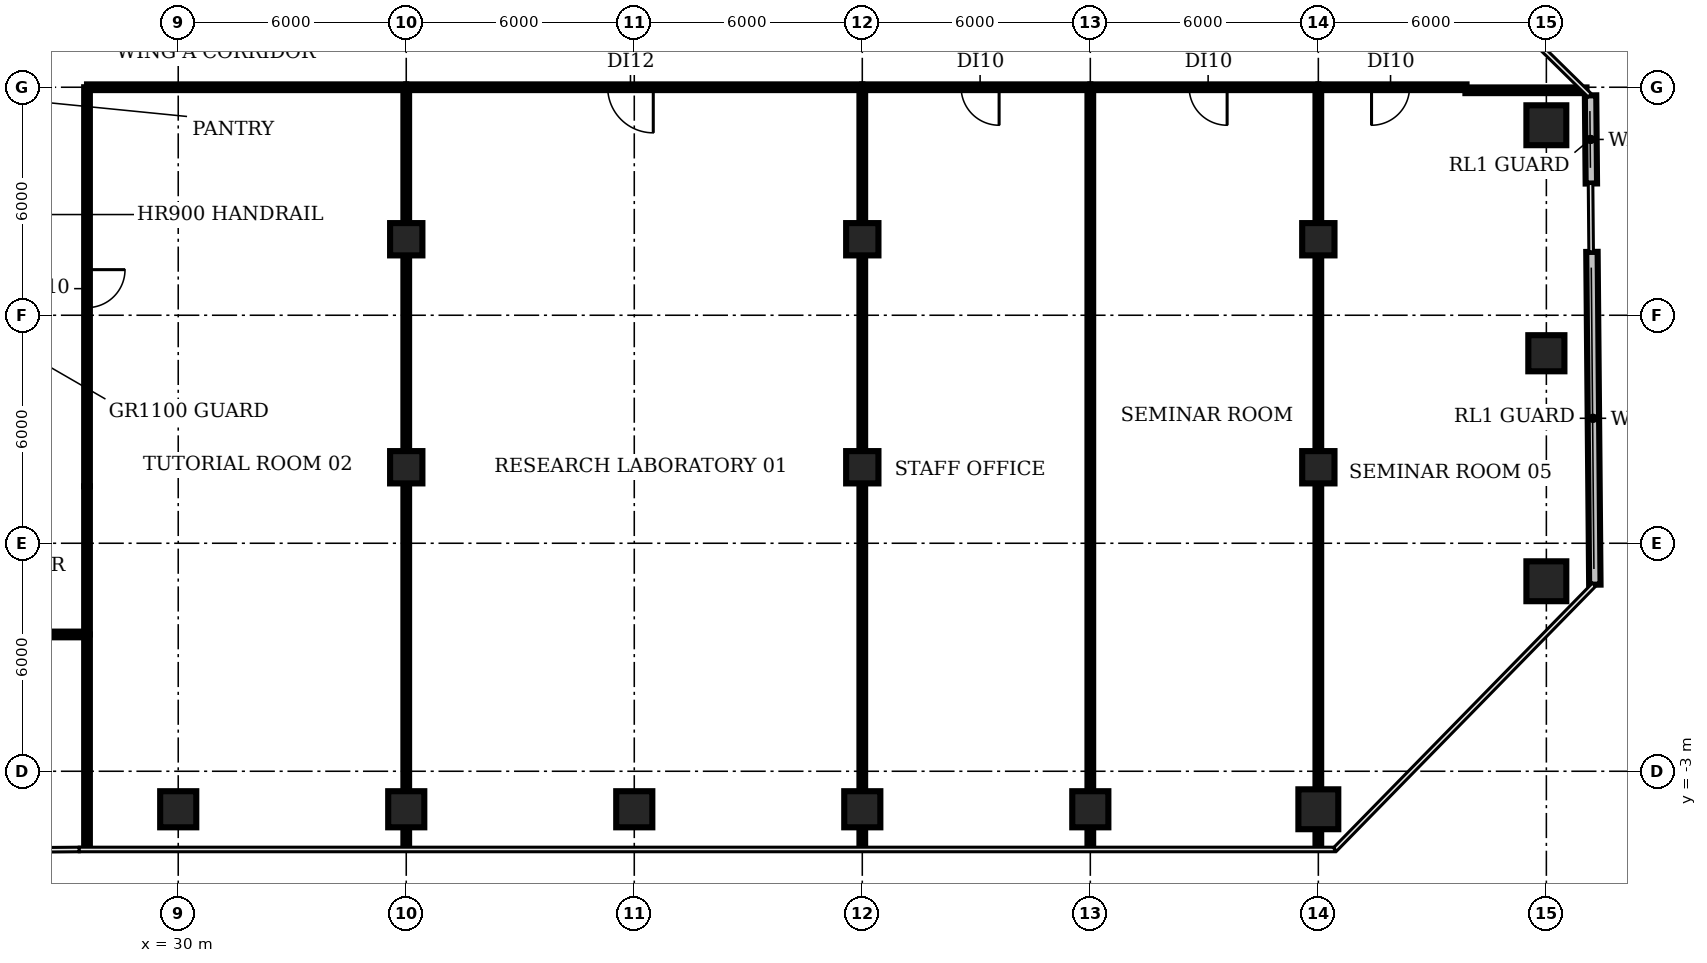
"""IFC4 building model, lengths in metres.
Left out: names, types, materials, properties, quantities, classifications, styles, units other than length and angle.
Written with IfcOpenShell. Run it as: python <this file> out.ifc"""

import sys

from ifc_helpers import new_model, si_unit, direction, frame, frame_2d, origin, origin_2d, place, context, subcontext, project, spatial, rectangle, circle, extrude, element, fill, save


model = new_model("IFC4")
c1 = context("Model", 3, precision=1e-05, world=origin(), true_north=direction((0.0, 1.0)))
c2 = subcontext(c1, "Body", "Model", "MODEL_VIEW")
j1 = project(units=[si_unit("LENGTHUNIT", "METRE"), si_unit("PLANEANGLEUNIT", "RADIAN")], contexts=[c1])
p1 = place(None, origin())
s1 = spatial("IfcSite", under=j1, at=p1, CompositionType="ELEMENT")
p2 = place(p1, origin())
s2 = spatial("IfcBuilding", under=s1, at=p2, CompositionType="ELEMENT")
p3 = place(p2, frame((0.0, 0.0, 54.2)))
s3 = spatial("IfcBuildingStorey", under=s2, at=p3, CompositionType="ELEMENT", Elevation=54.2)
for number, where, z_axis, x_axis in (
    (1, (30.0, -4.0, 0.0), (0.0, 0.0, 1.0), (1.0, 0.0, 0.0)),
    (2, (36.0, -4.0, 0.0), (0.0, 0.0, 1.0), (1.0, 0.0, 0.0)),
):
    element("IfcColumn", number, at=place(p3, frame(where, z_axis=z_axis, x_axis=x_axis)), inside=s3, PredefinedType="COLUMN", context=c2, shape_type="SweptSolid", body=[
        extrude(rectangle(XDim=0.95, YDim=0.95, at=origin_2d()), origin(), (0.0, 0.0, 1.0), 3.85),
    ])
for number, where, z_axis, x_axis in (
    (3, (36.0, 5.0, 0.0), (0.0, 0.0, 1.0), (1.0, 0.0, 0.0)),
    (4, (36.0, 11.0, 0.0), (0.0, 0.0, 1.0), (1.0, 0.0, 0.0)),
):
    element("IfcColumn", number, at=place(p3, frame(where, z_axis=z_axis, x_axis=x_axis)), inside=s3, PredefinedType="COLUMN", context=c2, shape_type="SweptSolid", body=[
        extrude(rectangle(XDim=0.85, YDim=0.85, at=origin_2d()), origin(), (0.0, 0.0, 1.0), 3.85),
    ])
for number, where, z_axis, x_axis in (
    (5, (42.0, -4.0, 0.0), (0.0, 0.0, 1.0), (1.0, 0.0, 0.0)),
    (6, (48.0, -4.0, 0.0), (0.0, 0.0, 1.0), (1.0, 0.0, 0.0)),
):
    element("IfcColumn", number, at=place(p3, frame(where, z_axis=z_axis, x_axis=x_axis)), inside=s3, PredefinedType="COLUMN", context=c2, shape_type="SweptSolid", body=[
        extrude(rectangle(XDim=0.95, YDim=0.95, at=origin_2d()), origin(), (0.0, 0.0, 1.0), 3.85),
    ])
for number, where, z_axis, x_axis in (
    (7, (48.0, 5.0, 0.0), (0.0, 0.0, 1.0), (1.0, 0.0, 0.0)),
    (8, (48.0, 11.0, 0.0), (0.0, 0.0, 1.0), (1.0, 0.0, 0.0)),
):
    element("IfcColumn", number, at=place(p3, frame(where, z_axis=z_axis, x_axis=x_axis)), inside=s3, PredefinedType="COLUMN", context=c2, shape_type="SweptSolid", body=[
        extrude(rectangle(XDim=0.85, YDim=0.85, at=origin_2d()), origin(), (0.0, 0.0, 1.0), 3.85),
    ])
p4 = place(p3, frame((54.0, -4.0, 0.0), z_axis=(0.0, 0.0, 1.0), x_axis=(1.0, 0.0, 0.0)))
e9 = element("IfcColumn", 9, at=p4, inside=s3, PredefinedType="COLUMN", context=c2, shape_type="SweptSolid", body=[
    extrude(rectangle(XDim=0.95, YDim=0.95, at=origin_2d()), origin(), (0.0, 0.0, 1.0), 3.85),
])
p5 = place(p3, frame((60.0, -4.0, 0.0), z_axis=(0.0, 0.0, 1.0), x_axis=(1.0, 0.0, 0.0)))
e10 = element("IfcColumn", 10, at=p5, inside=s3, PredefinedType="COLUMN", context=c2, shape_type="SweptSolid", body=[
    extrude(circle(Radius=0.525, at=origin_2d()), origin(), (0.0, 0.0, 1.0), 3.85),
])
for number, where, z_axis, x_axis in (
    (11, (60.0, 5.0, 0.0), (0.0, 0.0, 1.0), (1.0, 0.0, 0.0)),
    (12, (60.0, 11.0, 0.0), (0.0, 0.0, 1.0), (1.0, 0.0, 0.0)),
):
    element("IfcColumn", number, at=place(p3, frame(where, z_axis=z_axis, x_axis=x_axis)), inside=s3, PredefinedType="COLUMN", context=c2, shape_type="SweptSolid", body=[
        extrude(rectangle(XDim=0.85, YDim=0.85, at=origin_2d()), origin(), (0.0, 0.0, 1.0), 3.85),
    ])
p6 = place(p3, frame((66.0, 2.0, 0.0), z_axis=(0.0, 0.0, 1.0), x_axis=(1.0, 0.0, 0.0)))
e13 = element("IfcColumn", 13, at=p6, inside=s3, PredefinedType="COLUMN", context=c2, shape_type="SweptSolid", body=[
    extrude(circle(Radius=0.525, at=origin_2d()), origin(), (0.0, 0.0, 1.0), 3.85),
])
p7 = place(p3, frame((66.0, 8.0, 0.0), z_axis=(0.0, 0.0, 1.0), x_axis=(1.0, 0.0, 0.0)))
e14 = element("IfcColumn", 14, at=p7, inside=s3, PredefinedType="COLUMN", context=c2, shape_type="SweptSolid", body=[
    extrude(rectangle(XDim=0.95, YDim=0.95, at=origin_2d()), origin(), (0.0, 0.0, 1.0), 3.85),
])
p8 = place(p3, frame((66.0, 14.0, 0.0), z_axis=(0.0, 0.0, 1.0), x_axis=(1.0, 0.0, 0.0)))
e15 = element("IfcColumn", 15, at=p8, inside=s3, PredefinedType="COLUMN", context=c2, shape_type="SweptSolid", body=[
    extrude(circle(Radius=0.525, at=origin_2d()), origin(), (0.0, 0.0, 1.0), 3.85),
])
p9 = place(p3, frame((67.276, 1.91, 0.0), z_axis=(0.0, 0.0, 1.0), x_axis=(-0.008726109153, 0.999961926785, 0.0)))
e16 = element("IfcWall", 16, at=p9, inside=s3, PredefinedType="SOLIDWALL", context=c2, shape_type="SweptSolid", body=[
    extrude(rectangle(XDim=8.757, YDim=0.3, at=frame_2d((4.378, 0.0))), origin(), (0.0, 0.0, 1.0), 3.85),
])
p10 = place(p3, frame((67.184, 12.467, 0.0), z_axis=(0.0, 0.0, 1.0), x_axis=(-0.008738348184, 0.999961819907, 0.0)))
e17 = element("IfcWall", 17, at=p10, inside=s3, PredefinedType="SOLIDWALL", context=c2, shape_type="SweptSolid", body=[
    extrude(rectangle(XDim=2.319, YDim=0.3, at=frame_2d((1.159, 0.0))), origin(), (0.0, 0.0, 1.0), 3.85),
])
p11 = place(p3, frame((27.6, -5.01, 0.0), z_axis=(0.0, 0.0, 1.0), x_axis=(0.0, 1.0, 0.0)))
e18 = element("IfcWall", 18, at=p11, inside=s3, PredefinedType="PARTITIONING", context=c2, shape_type="SweptSolid", body=[
    extrude(rectangle(XDim=5.61, YDim=0.15, at=frame_2d((2.805, 0.0))), origin(), (0.0, 0.0, 1.0), 2.83),
])
p12 = place(p3, frame((27.6, 0.6, 0.0), z_axis=(0.0, 0.0, 1.0), x_axis=(-1.0, 0.0, 0.0)))
e19 = element("IfcWall", 19, at=p12, inside=s3, PredefinedType="PARTITIONING", context=c2, shape_type="SweptSolid", body=[
    extrude(rectangle(XDim=25.2, YDim=0.15, at=frame_2d((12.6, 0.0))), origin(), (0.0, 0.0, 1.0), 2.83),
])
p13 = place(p12, frame((12.1, 0.0, 0.0)))
e20 = element("IfcOpeningElement", 20, at=p13, cuts=e19, PredefinedType="OPENING", context=c2, shape_type="SweptSolid", body=[
    extrude(rectangle(XDim=1.2, YDim=2.1, at=frame_2d((0.6, 1.05))), frame((0.0, 0.085, 0.0), z_axis=(0.0, -1.0, 0.0), x_axis=(1.0, 0.0, 0.0)), (0.0, 0.0, 1.0), 0.17),
])
p14 = place(p3, frame((27.6, 0.6, 0.0), z_axis=(0.0, 0.0, 1.0), x_axis=(0.0, 1.0, 0.0)))
e21 = element("IfcWall", 21, at=p14, inside=s3, PredefinedType="PARTITIONING", context=c2, shape_type="SweptSolid", body=[
    extrude(rectangle(XDim=3.9, YDim=0.15, at=frame_2d((1.95, 0.0))), origin(), (0.0, 0.0, 1.0), 2.83),
])
p15 = place(p3, frame((27.6, 15.0, 0.0), z_axis=(0.0, 0.0, 1.0), x_axis=(0.0, -1.0, 0.0)))
e22 = element("IfcWall", 22, at=p15, inside=s3, PredefinedType="PARTITIONING", context=c2, shape_type="SweptSolid", body=[
    extrude(rectangle(XDim=10.5, YDim=0.15, at=frame_2d((5.25, 0.0))), origin(), (0.0, 0.0, 1.0), 2.83),
])
p16 = place(p15, frame((4.8, 0.0, 0.0)))
e23 = element("IfcOpeningElement", 23, at=p16, cuts=e22, PredefinedType="OPENING", context=c2, shape_type="SweptSolid", body=[
    extrude(rectangle(XDim=1.0, YDim=2.1, at=frame_2d((0.5, 1.05))), frame((0.0, 0.085, 0.0), z_axis=(0.0, -1.0, 0.0), x_axis=(1.0, 0.0, 0.0)), (0.0, 0.0, 1.0), 0.17),
])
p17 = place(p3, frame((27.6, 15.0, 0.0), z_axis=(0.0, 0.0, 1.0), x_axis=(1.0, 0.0, 0.0)))
e24 = element("IfcWall", 24, at=p17, inside=s3, PredefinedType="PARTITIONING", context=c2, shape_type="SweptSolid", body=[
    extrude(rectangle(XDim=8.4, YDim=0.15, at=frame_2d((4.2, 0.0))), origin(), (0.0, 0.0, 1.0), 2.83),
])
for number, where, z_axis, x_axis in (
    (25, (36.0, -5.01, 0.0), (0.0, 0.0, 1.0), (0.0, 1.0, 0.0)),
    (26, (48.0, -5.01, 0.0), (0.0, 0.0, 1.0), (0.0, 1.0, 0.0)),
):
    element("IfcWall", number, at=place(p3, frame(where, z_axis=z_axis, x_axis=x_axis)), inside=s3, PredefinedType="PARTITIONING", context=c2, shape_type="SweptSolid", body=[
        extrude(rectangle(XDim=20.01, YDim=0.15, at=frame_2d((10.005, 0.0))), origin(), (0.0, 0.0, 1.0), 2.83),
    ])
p18 = place(p3, frame((48.0, 15.0, 0.0), z_axis=(0.0, 0.0, 1.0), x_axis=(-1.0, 0.0, 0.0)))
e27 = element("IfcWall", 27, at=p18, inside=s3, PredefinedType="PARTITIONING", context=c2, shape_type="SweptSolid", body=[
    extrude(rectangle(XDim=12.0, YDim=0.15, at=frame_2d((6.0, 0.0))), origin(), (0.0, 0.0, 1.0), 2.83),
])
p19 = place(p18, frame((5.5, 0.0, 0.0)))
e28 = element("IfcOpeningElement", 28, at=p19, cuts=e27, PredefinedType="OPENING", context=c2, shape_type="SweptSolid", body=[
    extrude(rectangle(XDim=1.2, YDim=2.1, at=frame_2d((0.6, 1.05))), frame((0.0, 0.085, 0.0), z_axis=(0.0, -1.0, 0.0), x_axis=(1.0, 0.0, 0.0)), (0.0, 0.0, 1.0), 0.17),
])
p20 = place(p3, frame((54.0, -5.01, 0.0), z_axis=(0.0, 0.0, 1.0), x_axis=(0.0, 1.0, 0.0)))
e29 = element("IfcWall", 29, at=p20, inside=s3, PredefinedType="PARTITIONING", context=c2, shape_type="SweptSolid", body=[
    extrude(rectangle(XDim=20.01, YDim=0.15, at=frame_2d((10.005, 0.0))), origin(), (0.0, 0.0, 1.0), 2.83),
])
p21 = place(p3, frame((54.0, 15.0, 0.0), z_axis=(0.0, 0.0, 1.0), x_axis=(-1.0, 0.0, 0.0)))
e30 = element("IfcWall", 30, at=p21, inside=s3, PredefinedType="PARTITIONING", context=c2, shape_type="SweptSolid", body=[
    extrude(rectangle(XDim=6.0, YDim=0.15, at=frame_2d((3.0, 0.0))), origin(), (0.0, 0.0, 1.0), 2.83),
])
p22 = place(p21, frame((2.4, 0.0, 0.0)))
e31 = element("IfcOpeningElement", 31, at=p22, cuts=e30, PredefinedType="OPENING", context=c2, shape_type="SweptSolid", body=[
    extrude(rectangle(XDim=1.0, YDim=2.1, at=frame_2d((0.5, 1.05))), frame((0.0, 0.085, 0.0), z_axis=(0.0, -1.0, 0.0), x_axis=(1.0, 0.0, 0.0)), (0.0, 0.0, 1.0), 0.17),
])
p23 = place(p3, frame((60.0, -5.01, 0.0), z_axis=(0.0, 0.0, 1.0), x_axis=(0.0, 1.0, 0.0)))
e32 = element("IfcWall", 32, at=p23, inside=s3, PredefinedType="PARTITIONING", context=c2, shape_type="SweptSolid", body=[
    extrude(rectangle(XDim=20.01, YDim=0.15, at=frame_2d((10.005, 0.0))), origin(), (0.0, 0.0, 1.0), 2.83),
])
p24 = place(p3, frame((60.0, 15.0, 0.0), z_axis=(0.0, 0.0, 1.0), x_axis=(-1.0, 0.0, 0.0)))
e33 = element("IfcWall", 33, at=p24, inside=s3, PredefinedType="PARTITIONING", context=c2, shape_type="SweptSolid", body=[
    extrude(rectangle(XDim=6.0, YDim=0.15, at=frame_2d((3.0, 0.0))), origin(), (0.0, 0.0, 1.0), 2.83),
])
p25 = place(p24, frame((2.4, 0.0, 0.0)))
e34 = element("IfcOpeningElement", 34, at=p25, cuts=e33, PredefinedType="OPENING", context=c2, shape_type="SweptSolid", body=[
    extrude(rectangle(XDim=1.0, YDim=2.1, at=frame_2d((0.5, 1.05))), frame((0.0, 0.085, 0.0), z_axis=(0.0, -1.0, 0.0), x_axis=(1.0, 0.0, 0.0)), (0.0, 0.0, 1.0), 0.17),
])
p26 = place(p3, frame((63.87, 14.92, 0.0), z_axis=(0.0, 0.0, 1.0), x_axis=(1.0, 0.0, 0.0)))
e35 = element("IfcWall", 35, at=p26, inside=s3, PredefinedType="PARTITIONING", context=c2, shape_type="SweptSolid", body=[
    extrude(rectangle(XDim=3.186, YDim=0.15, at=frame_2d((1.593, 0.0))), origin(), (0.0, 0.0, 1.0), 2.83),
])
p27 = place(p3, frame((63.9, 15.0, 0.0), z_axis=(0.0, 0.0, 1.0), x_axis=(-1.0, 0.0, 0.0)))
e36 = element("IfcWall", 36, at=p27, inside=s3, PredefinedType="PARTITIONING", context=c2, shape_type="SweptSolid", body=[
    extrude(rectangle(XDim=3.9, YDim=0.15, at=frame_2d((1.95, 0.0))), origin(), (0.0, 0.0, 1.0), 2.83),
])
p28 = place(p27, frame((1.5, 0.0, 0.0)))
e37 = element("IfcOpeningElement", 37, at=p28, cuts=e36, PredefinedType="OPENING", context=c2, shape_type="SweptSolid", body=[
    extrude(rectangle(XDim=1.0, YDim=2.1, at=frame_2d((0.5, 1.05))), frame((0.0, 0.085, 0.0), z_axis=(0.0, -1.0, 0.0), x_axis=(1.0, 0.0, 0.0)), (0.0, 0.0, 1.0), 0.17),
])
p29 = place(p16, origin())
e38 = element("IfcDoor", 38, at=p29, inside=s3, OperationType="SINGLE_SWING_LEFT", PredefinedType="DOOR", context=c2, shape_type="SweptSolid", body=[
    extrude(rectangle(XDim=1.0, YDim=2.1, at=frame_2d((0.5, 1.05))), frame((0.0, 0.025, 0.0), z_axis=(0.0, -1.0, 0.0), x_axis=(1.0, 0.0, 0.0)), (0.0, 0.0, 1.0), 0.05),
])
fill(e23, e38)
p30 = place(p19, origin())
e39 = element("IfcDoor", 39, at=p30, inside=s3, OperationType="SINGLE_SWING_LEFT", PredefinedType="DOOR", context=c2, shape_type="SweptSolid", body=[
    extrude(rectangle(XDim=1.2, YDim=2.1, at=frame_2d((0.6, 1.05))), frame((0.0, 0.025, 0.0), z_axis=(0.0, -1.0, 0.0), x_axis=(1.0, 0.0, 0.0)), (0.0, 0.0, 1.0), 0.05),
])
fill(e28, e39)
p31 = place(p22, origin())
e40 = element("IfcDoor", 40, at=p31, inside=s3, OperationType="SINGLE_SWING_LEFT", PredefinedType="DOOR", context=c2, shape_type="SweptSolid", body=[
    extrude(rectangle(XDim=1.0, YDim=2.1, at=frame_2d((0.5, 1.05))), frame((0.0, 0.025, 0.0), z_axis=(0.0, -1.0, 0.0), x_axis=(1.0, 0.0, 0.0)), (0.0, 0.0, 1.0), 0.05),
])
fill(e31, e40)
p32 = place(p25, origin())
e41 = element("IfcDoor", 41, at=p32, inside=s3, OperationType="SINGLE_SWING_LEFT", PredefinedType="DOOR", context=c2, shape_type="SweptSolid", body=[
    extrude(rectangle(XDim=1.0, YDim=2.1, at=frame_2d((0.5, 1.05))), frame((0.0, 0.025, 0.0), z_axis=(0.0, -1.0, 0.0), x_axis=(1.0, 0.0, 0.0)), (0.0, 0.0, 1.0), 0.05),
])
fill(e34, e41)
p33 = place(p28, origin())
e42 = element("IfcDoor", 42, at=p33, inside=s3, OperationType="SINGLE_SWING_RIGHT", PredefinedType="DOOR", context=c2, shape_type="SweptSolid", body=[
    extrude(rectangle(XDim=1.0, YDim=2.1, at=frame_2d((0.5, 1.05))), frame((0.0, 0.025, 0.0), z_axis=(0.0, -1.0, 0.0), x_axis=(1.0, 0.0, 0.0)), (0.0, 0.0, 1.0), 0.05),
])
fill(e37, e42)
save(model, sys.argv[1])
